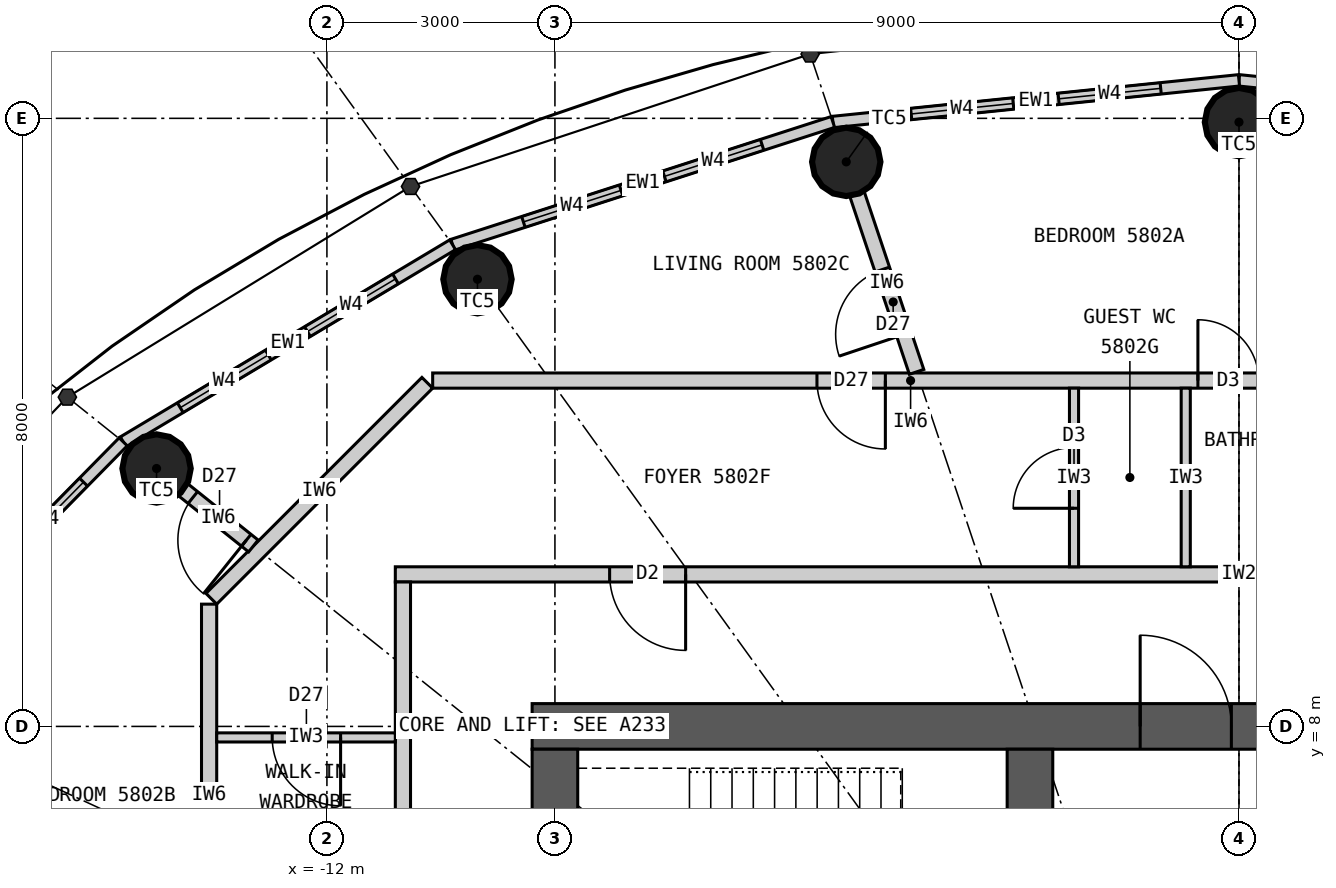
"""IFC4 building model, lengths in metres.
Left out: names, types, materials, properties, quantities, classifications, styles, units other than length and angle.
Written with IfcOpenShell. Run it as: python <this file> out.ifc"""

import sys

from ifc_helpers import new_model, si_unit, direction, frame, frame_2d, origin, origin_2d, place, context, subcontext, project, spatial, rectangle, circle, extrude, element, fill, save


model = new_model("IFC4")
c1 = context("Model", 3, precision=1e-05, world=origin(), true_north=direction((0.0, 1.0)))
c2 = subcontext(c1, "Body", "Model", "MODEL_VIEW")
j1 = project(units=[si_unit("LENGTHUNIT", "METRE"), si_unit("PLANEANGLEUNIT", "RADIAN")], contexts=[c1])
p1 = place(None, origin())
s1 = spatial("IfcSite", under=j1, at=p1, CompositionType="ELEMENT")
p2 = place(p1, origin())
s2 = spatial("IfcBuilding", under=s1, at=p2, CompositionType="ELEMENT")
p3 = place(p2, frame((0.0, 0.0, 216.0)))
s3 = spatial("IfcBuildingStorey", under=s2, at=p3, CompositionType="ELEMENT", Elevation=216.0)
for number, where, z_axis, x_axis in (
    (1, (0.0, 15.95, 0.0), (0.0, 0.0, 1.0), (1.0, 0.0, 0.0)),
    (2, (-5.167, 15.427, 0.0), (0.0, 0.0, 1.0), (1.0, 0.0, 0.0)),
    (3, (-10.019, 13.883, 0.0), (0.0, 0.0, 1.0), (1.0, 0.0, 0.0)),
    (4, (-14.241, 11.393, 0.0), (0.0, 0.0, 1.0), (1.0, 0.0, 0.0)),
):
    element("IfcColumn", number, at=place(p3, frame(where, z_axis=z_axis, x_axis=x_axis)), inside=s3, PredefinedType="COLUMN", context=c2, shape_type="SweptSolid", body=[
        extrude(circle(Radius=0.45, at=origin_2d()), origin(), (0.0, 0.0, 1.0), 3.3),
    ])
p4 = place(p3, frame((-9.3, 8.0, 0.0), z_axis=(0.0, 0.0, 1.0), x_axis=(1.0, 0.0, 0.0)))
e5 = element("IfcWall", 5, at=p4, inside=s3, PredefinedType="SHEAR", context=c2, shape_type="SweptSolid", body=[
    extrude(rectangle(XDim=18.6, YDim=0.6, at=frame_2d((9.3, 0.0))), origin(), (0.0, 0.0, 1.0), 3.3),
])
p5 = place(p4, frame((8.0, 0.0, 0.0)))
e6 = element("IfcOpeningElement", 6, at=p5, cuts=e5, PredefinedType="OPENING", context=c2, shape_type="SweptSolid", body=[
    extrude(rectangle(XDim=1.2, YDim=2.2, at=frame_2d((0.6, 1.1))), frame((0.0, 0.31, 0.0), z_axis=(0.0, -1.0, 0.0), x_axis=(1.0, 0.0, 0.0)), (0.0, 0.0, 1.0), 0.62),
])
p6 = place(p4, frame((15.6, 0.0, 0.0)))
e7 = element("IfcOpeningElement", 7, at=p6, cuts=e5, PredefinedType="OPENING", context=c2, shape_type="SweptSolid", body=[
    extrude(rectangle(XDim=0.9, YDim=2.2, at=frame_2d((0.45, 1.1))), frame((0.0, 0.31, 0.0), z_axis=(0.0, -1.0, 0.0), x_axis=(1.0, 0.0, 0.0)), (0.0, 0.0, 1.0), 0.62),
])
p7 = place(p3, frame((-9.0, 7.7, 0.0), z_axis=(0.0, 0.0, 1.0), x_axis=(0.0, -1.0, 0.0)))
e8 = element("IfcWall", 8, at=p7, inside=s3, PredefinedType="SHEAR", context=c2, shape_type="SweptSolid", body=[
    extrude(rectangle(XDim=15.4, YDim=0.6, at=frame_2d((7.7, 0.0))), origin(), (0.0, 0.0, 1.0), 3.3),
])
p8 = place(p7, frame((6.8, 0.0, 0.0)))
e9 = element("IfcOpeningElement", 9, at=p8, cuts=e8, PredefinedType="OPENING", context=c2, shape_type="SweptSolid", body=[
    extrude(rectangle(XDim=1.8, YDim=2.2, at=frame_2d((0.9, 1.1))), frame((0.0, 0.31, 0.0), z_axis=(0.0, -1.0, 0.0), x_axis=(1.0, 0.0, 0.0)), (0.0, 0.0, 1.0), 0.62),
])
p9 = place(p3, frame((-2.75, 4.5, 0.0), z_axis=(0.0, 0.0, 1.0), x_axis=(0.0, 1.0, 0.0)))
e10 = element("IfcWall", 10, at=p9, inside=s3, PredefinedType="SHEAR", context=c2, shape_type="SweptSolid", body=[
    extrude(rectangle(XDim=3.2, YDim=0.6, at=frame_2d((1.6, 0.0))), origin(), (0.0, 0.0, 1.0), 3.3),
])
p10 = place(p9, frame((0.925, 0.0, 0.0)))
e11 = element("IfcOpeningElement", 11, at=p10, cuts=e10, PredefinedType="OPENING", context=c2, shape_type="SweptSolid", body=[
    extrude(rectangle(XDim=1.1, YDim=2.2, at=frame_2d((0.55, 1.1))), frame((0.0, 0.31, 0.0), z_axis=(0.0, -1.0, 0.0), x_axis=(1.0, 0.0, 0.0)), (0.0, 0.0, 1.0), 0.62),
])
p11 = place(p3, frame((5.343, 15.952, 0.0), z_axis=(0.0, 0.0, 1.0), x_axis=(-0.994774574972, 0.102095763818, 0.0)))
e12 = element("IfcWall", 12, at=p11, inside=s3, PredefinedType="ELEMENTEDWALL", context=c2, shape_type="SweptSolid", body=[
    extrude(rectangle(XDim=5.371, YDim=0.15, at=frame_2d((2.686, 0.0))), origin(), (0.0, 0.0, 1.0), 3.12),
])
p12 = place(p11, frame((1.035, 0.0, 0.9)))
e13 = element("IfcOpeningElement", 13, at=p12, cuts=e12, PredefinedType="OPENING", context=c2, shape_type="SweptSolid", body=[
    extrude(rectangle(XDim=1.35, YDim=1.9, at=frame_2d((0.675, 0.95))), frame((0.0, 0.085, 0.0), z_axis=(0.0, -1.0, 0.0), x_axis=(1.0, 0.0, 0.0)), (0.0, 0.0, 1.0), 0.17),
])
p13 = place(p11, frame((2.985, 0.0, 0.9)))
e14 = element("IfcOpeningElement", 14, at=p13, cuts=e12, PredefinedType="OPENING", context=c2, shape_type="SweptSolid", body=[
    extrude(rectangle(XDim=1.35, YDim=1.9, at=frame_2d((0.675, 0.95))), frame((0.0, 0.085, 0.0), z_axis=(0.0, -1.0, 0.0), x_axis=(1.0, 0.0, 0.0)), (0.0, 0.0, 1.0), 0.17),
])
p14 = place(p3, frame((0.0, 16.5, 0.0), z_axis=(0.0, 0.0, 1.0), x_axis=(-0.994774574972, -0.102095763818, 0.0)))
e15 = element("IfcWall", 15, at=p14, inside=s3, PredefinedType="ELEMENTEDWALL", context=c2, shape_type="SweptSolid", body=[
    extrude(rectangle(XDim=5.371, YDim=0.15, at=frame_2d((2.686, 0.0))), origin(), (0.0, 0.0, 1.0), 3.12),
])
p15 = place(p14, frame((1.035, 0.0, 0.9)))
e16 = element("IfcOpeningElement", 16, at=p15, cuts=e15, PredefinedType="OPENING", context=c2, shape_type="SweptSolid", body=[
    extrude(rectangle(XDim=1.35, YDim=1.9, at=frame_2d((0.675, 0.95))), frame((0.0, 0.085, 0.0), z_axis=(0.0, -1.0, 0.0), x_axis=(1.0, 0.0, 0.0)), (0.0, 0.0, 1.0), 0.17),
])
p16 = place(p14, frame((2.985, 0.0, 0.9)))
e17 = element("IfcOpeningElement", 17, at=p16, cuts=e15, PredefinedType="OPENING", context=c2, shape_type="SweptSolid", body=[
    extrude(rectangle(XDim=1.35, YDim=1.9, at=frame_2d((0.675, 0.95))), frame((0.0, 0.085, 0.0), z_axis=(0.0, -1.0, 0.0), x_axis=(1.0, 0.0, 0.0)), (0.0, 0.0, 1.0), 0.17),
])
p17 = place(p3, frame((-5.343, 15.952, 0.0), z_axis=(0.0, 0.0, 1.0), x_axis=(-0.951644702515, -0.307200846638, 0.0)))
e18 = element("IfcWall", 18, at=p17, inside=s3, PredefinedType="ELEMENTEDWALL", context=c2, shape_type="SweptSolid", body=[
    extrude(rectangle(XDim=5.258, YDim=0.15, at=frame_2d((2.629, 0.0))), origin(), (0.0, 0.0, 1.0), 3.12),
])
p18 = place(p17, frame((0.979, 0.0, 0.9)))
e19 = element("IfcOpeningElement", 19, at=p18, cuts=e18, PredefinedType="OPENING", context=c2, shape_type="SweptSolid", body=[
    extrude(rectangle(XDim=1.35, YDim=1.9, at=frame_2d((0.675, 0.95))), frame((0.0, 0.085, 0.0), z_axis=(0.0, -1.0, 0.0), x_axis=(1.0, 0.0, 0.0)), (0.0, 0.0, 1.0), 0.17),
])
p19 = place(p17, frame((2.929, 0.0, 0.9)))
e20 = element("IfcOpeningElement", 20, at=p19, cuts=e18, PredefinedType="OPENING", context=c2, shape_type="SweptSolid", body=[
    extrude(rectangle(XDim=1.35, YDim=1.9, at=frame_2d((0.675, 0.95))), frame((0.0, 0.085, 0.0), z_axis=(0.0, -1.0, 0.0), x_axis=(1.0, 0.0, 0.0)), (0.0, 0.0, 1.0), 0.17),
])
p20 = place(p3, frame((-10.346, 14.336, 0.0), z_axis=(0.0, 0.0, 1.0), x_axis=(-0.85822150553, -0.513279502265, 0.0)))
e21 = element("IfcWall", 21, at=p20, inside=s3, PredefinedType="ELEMENTEDWALL", context=c2, shape_type="SweptSolid", body=[
    extrude(rectangle(XDim=5.05, YDim=0.15, at=frame_2d((2.525, 0.0))), origin(), (0.0, 0.0, 1.0), 3.12),
])
p21 = place(p20, frame((0.875, 0.0, 0.9)))
e22 = element("IfcOpeningElement", 22, at=p21, cuts=e21, PredefinedType="OPENING", context=c2, shape_type="SweptSolid", body=[
    extrude(rectangle(XDim=1.35, YDim=1.9, at=frame_2d((0.675, 0.95))), frame((0.0, 0.085, 0.0), z_axis=(0.0, -1.0, 0.0), x_axis=(1.0, 0.0, 0.0)), (0.0, 0.0, 1.0), 0.17),
])
p22 = place(p20, frame((2.825, 0.0, 0.9)))
e23 = element("IfcOpeningElement", 23, at=p22, cuts=e21, PredefinedType="OPENING", context=c2, shape_type="SweptSolid", body=[
    extrude(rectangle(XDim=1.35, YDim=1.9, at=frame_2d((0.675, 0.95))), frame((0.0, 0.085, 0.0), z_axis=(0.0, -1.0, 0.0), x_axis=(1.0, 0.0, 0.0)), (0.0, 0.0, 1.0), 0.17),
])
p23 = place(p3, frame((-14.68, 11.744, 0.0), z_axis=(0.0, 0.0, 1.0), x_axis=(-0.701527379618, -0.712642501993, 0.0)))
e24 = element("IfcWall", 24, at=p23, inside=s3, PredefinedType="ELEMENTEDWALL", context=c2, shape_type="SweptSolid", body=[
    extrude(rectangle(XDim=4.788, YDim=0.15, at=frame_2d((2.394, 0.0))), origin(), (0.0, 0.0, 1.0), 3.12),
])
p24 = place(p23, frame((0.744, 0.0, 0.9)))
e25 = element("IfcOpeningElement", 25, at=p24, cuts=e24, PredefinedType="OPENING", context=c2, shape_type="SweptSolid", body=[
    extrude(rectangle(XDim=1.35, YDim=1.9, at=frame_2d((0.675, 0.95))), frame((0.0, 0.085, 0.0), z_axis=(0.0, -1.0, 0.0), x_axis=(1.0, 0.0, 0.0)), (0.0, 0.0, 1.0), 0.17),
])
p25 = place(p23, frame((2.694, 0.0, 0.9)))
e26 = element("IfcOpeningElement", 26, at=p25, cuts=e24, PredefinedType="OPENING", context=c2, shape_type="SweptSolid", body=[
    extrude(rectangle(XDim=1.35, YDim=1.9, at=frame_2d((0.675, 0.95))), frame((0.0, 0.085, 0.0), z_axis=(0.0, -1.0, 0.0), x_axis=(1.0, 0.0, 0.0)), (0.0, 0.0, 1.0), 0.17),
])
p26 = place(p3, frame((-11.1, 10.0, 0.0), z_axis=(0.0, 0.0, 1.0), x_axis=(1.0, 0.0, 0.0)))
e27 = element("IfcWall", 27, at=p26, inside=s3, PredefinedType="PARTITIONING", context=c2, shape_type="SweptSolid", body=[
    extrude(rectangle(XDim=22.2, YDim=0.2, at=frame_2d((11.1, 0.0))), origin(), (0.0, 0.0, 1.0), 3.12),
])
p27 = place(p26, frame((20.9, 0.0, 0.0)))
e28 = element("IfcOpeningElement", 28, at=p27, cuts=e27, PredefinedType="OPENING", context=c2, shape_type="SweptSolid", body=[
    extrude(rectangle(XDim=1.0, YDim=2.2, at=frame_2d((0.5, 1.1))), frame((0.0, 0.11, 0.0), z_axis=(0.0, -1.0, 0.0), x_axis=(1.0, 0.0, 0.0)), (0.0, 0.0, 1.0), 0.22),
])
p28 = place(p26, frame((2.82, 0.0, 0.0)))
e29 = element("IfcOpeningElement", 29, at=p28, cuts=e27, PredefinedType="OPENING", context=c2, shape_type="SweptSolid", body=[
    extrude(rectangle(XDim=1.0, YDim=2.2, at=frame_2d((0.5, 1.1))), frame((0.0, 0.11, 0.0), z_axis=(0.0, -1.0, 0.0), x_axis=(1.0, 0.0, 0.0)), (0.0, 0.0, 1.0), 0.22),
])
p29 = place(p3, frame((-11.0, 9.9, 0.0), z_axis=(0.0, 0.0, 1.0), x_axis=(0.0, -1.0, 0.0)))
e30 = element("IfcWall", 30, at=p29, inside=s3, PredefinedType="PARTITIONING", context=c2, shape_type="SweptSolid", body=[
    extrude(rectangle(XDim=10.114, YDim=0.2, at=frame_2d((5.057, 0.0))), origin(), (0.0, 0.0, 1.0), 3.12),
])
p30 = place(p3, frame((1.968, 12.55, 0.0), z_axis=(0.0, 0.0, 1.0), x_axis=(-1.0, 0.0, 0.0)))
e31 = element("IfcWall", 31, at=p30, inside=s3, PredefinedType="PARTITIONING", context=c2, shape_type="SweptSolid", body=[
    extrude(rectangle(XDim=12.576, YDim=0.2, at=frame_2d((6.288, 0.0))), origin(), (0.0, 0.0, 1.0), 3.12),
])
p31 = place(p30, frame((1.708, 0.0, 0.0)))
e32 = element("IfcOpeningElement", 32, at=p31, cuts=e31, PredefinedType="OPENING", context=c2, shape_type="SweptSolid", body=[
    extrude(rectangle(XDim=0.8, YDim=2.1, at=frame_2d((0.4, 1.05))), frame((0.0, 0.11, 0.0), z_axis=(0.0, -1.0, 0.0), x_axis=(1.0, 0.0, 0.0)), (0.0, 0.0, 1.0), 0.22),
])
p32 = place(p30, frame((6.62, 0.0, 0.0)))
e33 = element("IfcOpeningElement", 33, at=p32, cuts=e31, PredefinedType="OPENING", context=c2, shape_type="SweptSolid", body=[
    extrude(rectangle(XDim=0.9, YDim=2.1, at=frame_2d((0.45, 1.05))), frame((0.0, 0.11, 0.0), z_axis=(0.0, -1.0, 0.0), x_axis=(1.0, 0.0, 0.0)), (0.0, 0.0, 1.0), 0.22),
])
p33 = place(p3, frame((-10.679, 12.521, 0.0), z_axis=(0.0, 0.0, 1.0), x_axis=(-0.707106781187, -0.707106781187, 0.0)))
e34 = element("IfcWall", 34, at=p33, inside=s3, PredefinedType="PARTITIONING", context=c2, shape_type="SweptSolid", body=[
    extrude(rectangle(XDim=4.019, YDim=0.2, at=frame_2d((2.009, 0.0))), origin(), (0.0, 0.0, 1.0), 3.12),
])
p34 = place(p3, frame((-13.55, 9.609, 0.0), z_axis=(0.0, 0.0, 1.0), x_axis=(0.0, -1.0, 0.0)))
e35 = element("IfcWall", 35, at=p34, inside=s3, PredefinedType="PARTITIONING", context=c2, shape_type="SweptSolid", body=[
    extrude(rectangle(XDim=5.009, YDim=0.2, at=frame_2d((2.504, 0.0))), origin(), (0.0, 0.0, 1.0), 3.12),
])
p35 = place(p34, frame((3.633, 0.0, 0.0)))
e36 = element("IfcOpeningElement", 36, at=p35, cuts=e35, PredefinedType="OPENING", context=c2, shape_type="SweptSolid", body=[
    extrude(rectangle(XDim=0.8, YDim=2.1, at=frame_2d((0.4, 1.05))), frame((0.0, 0.11, 0.0), z_axis=(0.0, -1.0, 0.0), x_axis=(1.0, 0.0, 0.0)), (0.0, 0.0, 1.0), 0.22),
])
p36 = place(p3, frame((-4.242, 12.664, 0.0), z_axis=(0.0, 0.0, 1.0), x_axis=(-0.317594928911, 0.948226481981, 0.0)))
e37 = element("IfcWall", 37, at=p36, inside=s3, PredefinedType="PARTITIONING", context=c2, shape_type="SweptSolid", body=[
    extrude(rectangle(XDim=2.464, YDim=0.2, at=frame_2d((1.232, 0.0))), origin(), (0.0, 0.0, 1.0), 2.42),
])
p37 = place(p36, frame((0.52, 0.0, 0.0)))
e38 = element("IfcOpeningElement", 38, at=p37, cuts=e37, PredefinedType="OPENING", context=c2, shape_type="SweptSolid", body=[
    extrude(rectangle(XDim=0.9, YDim=2.1, at=frame_2d((0.45, 1.05))), frame((0.0, 0.11, 0.0), z_axis=(0.0, -1.0, 0.0), x_axis=(1.0, 0.0, 0.0)), (0.0, 0.0, 1.0), 0.22),
])
p38 = place(p3, frame((-12.968, 10.374, 0.0), z_axis=(0.0, 0.0, 1.0), x_axis=(-0.780888968944, 0.624669847345, 0.0)))
e39 = element("IfcWall", 39, at=p38, inside=s3, PredefinedType="PARTITIONING", context=c2, shape_type="SweptSolid", body=[
    extrude(rectangle(XDim=1.181, YDim=0.2, at=frame_2d((0.591, 0.0))), origin(), (0.0, 0.0, 1.0), 2.42),
])
p39 = place(p38, frame((0.12, 0.0, 0.0)))
e40 = element("IfcOpeningElement", 40, at=p39, cuts=e39, PredefinedType="OPENING", context=c2, shape_type="SweptSolid", body=[
    extrude(rectangle(XDim=0.9, YDim=2.1, at=frame_2d((0.45, 1.05))), frame((0.0, 0.11, 0.0), z_axis=(0.0, -1.0, 0.0), x_axis=(1.0, 0.0, 0.0)), (0.0, 0.0, 1.0), 0.22),
])
p40 = place(p3, frame((-0.7, 10.1, 0.0), z_axis=(0.0, 0.0, 1.0), x_axis=(0.0, 1.0, 0.0)))
e41 = element("IfcWall", 41, at=p40, inside=s3, PredefinedType="PARTITIONING", context=c2, shape_type="SweptSolid", body=[
    extrude(rectangle(XDim=2.35, YDim=0.12, at=frame_2d((1.175, 0.0))), origin(), (0.0, 0.0, 1.0), 3.12),
])
p41 = place(p3, frame((-2.17, 10.1, 0.0), z_axis=(0.0, 0.0, 1.0), x_axis=(0.0, 1.0, 0.0)))
e42 = element("IfcWall", 42, at=p41, inside=s3, PredefinedType="PARTITIONING", context=c2, shape_type="SweptSolid", body=[
    extrude(rectangle(XDim=2.35, YDim=0.12, at=frame_2d((1.175, 0.0))), origin(), (0.0, 0.0, 1.0), 3.12),
])
p42 = place(p41, frame((0.77, 0.0, 0.0)))
e43 = element("IfcOpeningElement", 43, at=p42, cuts=e42, PredefinedType="OPENING", context=c2, shape_type="SweptSolid", body=[
    extrude(rectangle(XDim=0.8, YDim=2.1, at=frame_2d((0.4, 1.05))), frame((0.0, 0.07, 0.0), z_axis=(0.0, -1.0, 0.0), x_axis=(1.0, 0.0, 0.0)), (0.0, 0.0, 1.0), 0.14),
])
p43 = place(p3, frame((-11.1, 7.855, 0.0), z_axis=(0.0, 0.0, 1.0), x_axis=(-1.0, 0.0, 0.0)))
e44 = element("IfcWall", 44, at=p43, inside=s3, PredefinedType="PARTITIONING", context=c2, shape_type="SweptSolid", body=[
    extrude(rectangle(XDim=2.35, YDim=0.12, at=frame_2d((1.175, 0.0))), origin(), (0.0, 0.0, 1.0), 3.12),
])
p44 = place(p43, frame((0.72, 0.0, 0.0)))
e45 = element("IfcOpeningElement", 45, at=p44, cuts=e44, PredefinedType="OPENING", context=c2, shape_type="SweptSolid", body=[
    extrude(rectangle(XDim=0.9, YDim=2.1, at=frame_2d((0.45, 1.05))), frame((0.0, 0.07, 0.0), z_axis=(0.0, -1.0, 0.0), x_axis=(1.0, 0.0, 0.0)), (0.0, 0.0, 1.0), 0.14),
])
p45 = place(p15, origin())
e46 = element("IfcWindow", 46, at=p45, inside=s3, PartitioningType="SINGLE_PANEL", PredefinedType="WINDOW", context=c2, shape_type="SweptSolid", body=[
    extrude(rectangle(XDim=1.35, YDim=1.9, at=frame_2d((0.675, 0.95))), frame((0.0, 0.03, 0.0), z_axis=(0.0, -1.0, 0.0), x_axis=(1.0, 0.0, 0.0)), (0.0, 0.0, 1.0), 0.06),
])
fill(e16, e46)
p46 = place(p16, origin())
e47 = element("IfcWindow", 47, at=p46, inside=s3, PartitioningType="SINGLE_PANEL", PredefinedType="WINDOW", context=c2, shape_type="SweptSolid", body=[
    extrude(rectangle(XDim=1.35, YDim=1.9, at=frame_2d((0.675, 0.95))), frame((0.0, 0.03, 0.0), z_axis=(0.0, -1.0, 0.0), x_axis=(1.0, 0.0, 0.0)), (0.0, 0.0, 1.0), 0.06),
])
fill(e17, e47)
p47 = place(p18, origin())
e48 = element("IfcWindow", 48, at=p47, inside=s3, PartitioningType="SINGLE_PANEL", PredefinedType="WINDOW", context=c2, shape_type="SweptSolid", body=[
    extrude(rectangle(XDim=1.35, YDim=1.9, at=frame_2d((0.675, 0.95))), frame((0.0, 0.03, 0.0), z_axis=(0.0, -1.0, 0.0), x_axis=(1.0, 0.0, 0.0)), (0.0, 0.0, 1.0), 0.06),
])
fill(e19, e48)
p48 = place(p19, origin())
e49 = element("IfcWindow", 49, at=p48, inside=s3, PartitioningType="SINGLE_PANEL", PredefinedType="WINDOW", context=c2, shape_type="SweptSolid", body=[
    extrude(rectangle(XDim=1.35, YDim=1.9, at=frame_2d((0.675, 0.95))), frame((0.0, 0.03, 0.0), z_axis=(0.0, -1.0, 0.0), x_axis=(1.0, 0.0, 0.0)), (0.0, 0.0, 1.0), 0.06),
])
fill(e20, e49)
p49 = place(p21, origin())
e50 = element("IfcWindow", 50, at=p49, inside=s3, PartitioningType="SINGLE_PANEL", PredefinedType="WINDOW", context=c2, shape_type="SweptSolid", body=[
    extrude(rectangle(XDim=1.35, YDim=1.9, at=frame_2d((0.675, 0.95))), frame((0.0, 0.03, 0.0), z_axis=(0.0, -1.0, 0.0), x_axis=(1.0, 0.0, 0.0)), (0.0, 0.0, 1.0), 0.06),
])
fill(e22, e50)
p50 = place(p22, origin())
e51 = element("IfcWindow", 51, at=p50, inside=s3, PartitioningType="SINGLE_PANEL", PredefinedType="WINDOW", context=c2, shape_type="SweptSolid", body=[
    extrude(rectangle(XDim=1.35, YDim=1.9, at=frame_2d((0.675, 0.95))), frame((0.0, 0.03, 0.0), z_axis=(0.0, -1.0, 0.0), x_axis=(1.0, 0.0, 0.0)), (0.0, 0.0, 1.0), 0.06),
])
fill(e23, e51)
p51 = place(p24, origin())
e52 = element("IfcWindow", 52, at=p51, inside=s3, PartitioningType="SINGLE_PANEL", PredefinedType="WINDOW", context=c2, shape_type="SweptSolid", body=[
    extrude(rectangle(XDim=1.35, YDim=1.9, at=frame_2d((0.675, 0.95))), frame((0.0, 0.03, 0.0), z_axis=(0.0, -1.0, 0.0), x_axis=(1.0, 0.0, 0.0)), (0.0, 0.0, 1.0), 0.06),
])
fill(e25, e52)
p52 = place(p28, origin())
e53 = element("IfcDoor", 53, at=p52, inside=s3, OperationType="SINGLE_SWING_RIGHT", PredefinedType="DOOR", context=c2, shape_type="SweptSolid", body=[
    extrude(rectangle(XDim=1.0, YDim=2.2, at=frame_2d((0.5, 1.1))), frame((0.0, 0.025, 0.0), z_axis=(0.0, -1.0, 0.0), x_axis=(1.0, 0.0, 0.0)), (0.0, 0.0, 1.0), 0.05),
])
fill(e29, e53)
p53 = place(p31, origin())
e54 = element("IfcDoor", 54, at=p53, inside=s3, OperationType="SINGLE_SWING_RIGHT", PredefinedType="DOOR", context=c2, shape_type="SweptSolid", body=[
    extrude(rectangle(XDim=0.8, YDim=2.1, at=frame_2d((0.4, 1.05))), frame((0.0, 0.025, 0.0), z_axis=(0.0, -1.0, 0.0), x_axis=(1.0, 0.0, 0.0)), (0.0, 0.0, 1.0), 0.05),
])
fill(e32, e54)
p54 = place(p42, origin())
e55 = element("IfcDoor", 55, at=p54, inside=s3, OperationType="SINGLE_SWING_LEFT", PredefinedType="DOOR", context=c2, shape_type="SweptSolid", body=[
    extrude(rectangle(XDim=0.8, YDim=2.1, at=frame_2d((0.4, 1.05))), frame((0.0, 0.025, 0.0), z_axis=(0.0, -1.0, 0.0), x_axis=(1.0, 0.0, 0.0)), (0.0, 0.0, 1.0), 0.05),
])
fill(e43, e55)
p55 = place(p44, origin())
e56 = element("IfcDoor", 56, at=p55, inside=s3, OperationType="SINGLE_SWING_LEFT", PredefinedType="DOOR", context=c2, shape_type="SweptSolid", body=[
    extrude(rectangle(XDim=0.9, YDim=2.1, at=frame_2d((0.45, 1.05))), frame((0.0, 0.025, 0.0), z_axis=(0.0, -1.0, 0.0), x_axis=(1.0, 0.0, 0.0)), (0.0, 0.0, 1.0), 0.05),
])
fill(e45, e56)
p56 = place(p32, origin())
e57 = element("IfcDoor", 57, at=p56, inside=s3, OperationType="SINGLE_SWING_LEFT", PredefinedType="DOOR", context=c2, shape_type="SweptSolid", body=[
    extrude(rectangle(XDim=0.9, YDim=2.1, at=frame_2d((0.45, 1.05))), frame((0.0, 0.025, 0.0), z_axis=(0.0, -1.0, 0.0), x_axis=(1.0, 0.0, 0.0)), (0.0, 0.0, 1.0), 0.05),
])
fill(e33, e57)
p57 = place(p37, origin())
e58 = element("IfcDoor", 58, at=p57, inside=s3, OperationType="SINGLE_SWING_LEFT", PredefinedType="DOOR", context=c2, shape_type="SweptSolid", body=[
    extrude(rectangle(XDim=0.9, YDim=2.1, at=frame_2d((0.45, 1.05))), frame((0.0, 0.025, 0.0), z_axis=(0.0, -1.0, 0.0), x_axis=(1.0, 0.0, 0.0)), (0.0, 0.0, 1.0), 0.05),
])
fill(e38, e58)
p58 = place(p39, origin())
e59 = element("IfcDoor", 59, at=p58, inside=s3, OperationType="SINGLE_SWING_LEFT", PredefinedType="DOOR", context=c2, shape_type="SweptSolid", body=[
    extrude(rectangle(XDim=0.9, YDim=2.1, at=frame_2d((0.45, 1.05))), frame((0.0, 0.025, 0.0), z_axis=(0.0, -1.0, 0.0), x_axis=(1.0, 0.0, 0.0)), (0.0, 0.0, 1.0), 0.05),
])
fill(e40, e59)
p59 = place(p5, origin())
e60 = element("IfcDoor", 60, at=p59, inside=s3, OperationType="SINGLE_SWING_LEFT", PredefinedType="DOOR", context=c2, shape_type="SweptSolid", body=[
    extrude(rectangle(XDim=1.2, YDim=2.2, at=frame_2d((0.6, 1.1))), frame((0.0, 0.025, 0.0), z_axis=(0.0, -1.0, 0.0), x_axis=(1.0, 0.0, 0.0)), (0.0, 0.0, 1.0), 0.05),
])
fill(e6, e60)
save(model, sys.argv[1])
